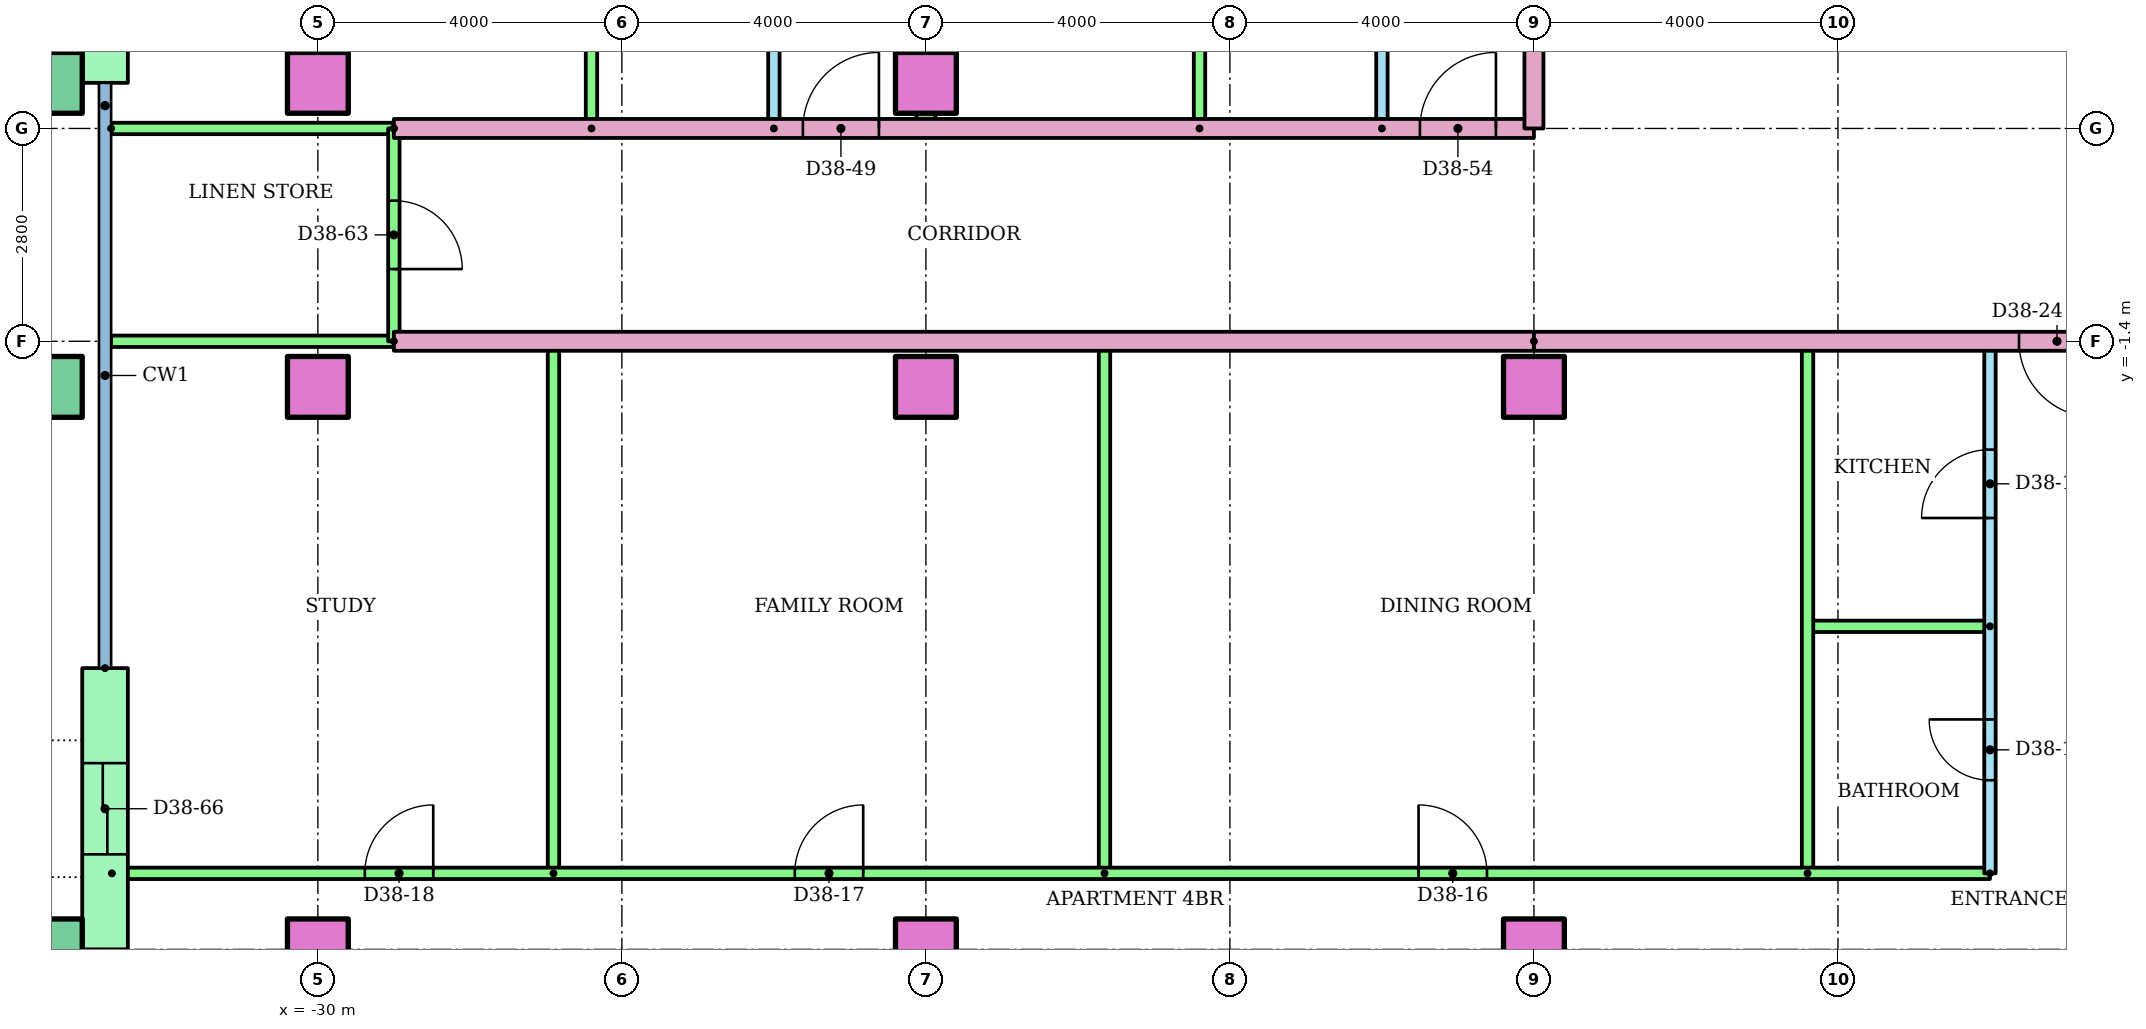
"""IFC4 building model, lengths in metres.
Left out: names, types, materials, properties, quantities, classifications, styles, units other than length and angle.
Written with IfcOpenShell. Run it as: python <this file> out.ifc"""

import sys

from ifc_helpers import new_model, si_unit, direction, frame, frame_2d, origin, origin_2d, place, context, subcontext, project, spatial, rectangle, hollow_rectangle, extrude, element, fill, save


model = new_model("IFC4")
c1 = context("Model", 3, precision=1e-05, world=origin(), true_north=direction((0.0, 1.0)))
c2 = subcontext(c1, "Body", "Model", "MODEL_VIEW")
j1 = project(units=[si_unit("LENGTHUNIT", "METRE"), si_unit("PLANEANGLEUNIT", "RADIAN")], contexts=[c1])
p1 = place(None, origin())
s1 = spatial("IfcSite", under=j1, at=p1, CompositionType="ELEMENT")
p2 = place(p1, origin())
s2 = spatial("IfcBuilding", under=s1, at=p2, CompositionType="ELEMENT")
p3 = place(p2, frame((0.0, 0.0, 145.4)))
s3 = spatial("IfcBuildingStorey", under=s2, at=p3, CompositionType="ELEMENT", Elevation=145.4)
p4 = place(p3, frame((-33.5, -9.4, 0.0)))
e1 = element("IfcColumn", 1, at=p4, inside=s3, PredefinedType="COLUMN", context=c2, shape_type="SweptSolid", body=[
    extrude(hollow_rectangle(XDim=0.8, YDim=0.8, WallThickness=0.04, at=origin_2d()), origin(), (0.0, 0.0, 1.0), 3.2),
])
for number, where in (
    (2, (-30.0, -9.4, 0.0)),
    (3, (-22.0, -9.4, 0.0)),
    (4, (-14.0, -9.4, 0.0)),
):
    element("IfcColumn", number, at=place(p3, frame(where)), inside=s3, PredefinedType="COLUMN", context=c2, shape_type="SweptSolid", body=[
        extrude(rectangle(XDim=0.8, YDim=0.8, at=origin_2d()), origin(), (0.0, 0.0, 1.0), 3.2),
    ])
p5 = place(p3, frame((-33.5, -2.0, 0.0)))
e5 = element("IfcColumn", 5, at=p5, inside=s3, PredefinedType="COLUMN", context=c2, shape_type="SweptSolid", body=[
    extrude(hollow_rectangle(XDim=0.8, YDim=0.8, WallThickness=0.04, at=origin_2d()), origin(), (0.0, 0.0, 1.0), 3.2),
])
for number, where in (
    (6, (-30.0, -2.0, 0.0)),
    (7, (-22.0, -2.0, 0.0)),
    (8, (-14.0, -2.0, 0.0)),
):
    element("IfcColumn", number, at=place(p3, frame(where)), inside=s3, PredefinedType="COLUMN", context=c2, shape_type="SweptSolid", body=[
        extrude(rectangle(XDim=0.8, YDim=0.8, at=origin_2d()), origin(), (0.0, 0.0, 1.0), 3.2),
    ])
p6 = place(p3, frame((-33.5, 2.0, 0.0)))
e9 = element("IfcColumn", 9, at=p6, inside=s3, PredefinedType="COLUMN", context=c2, shape_type="SweptSolid", body=[
    extrude(hollow_rectangle(XDim=0.8, YDim=0.8, WallThickness=0.04, at=origin_2d()), origin(), (0.0, 0.0, 1.0), 3.2),
])
for number, where in (
    (10, (-30.0, 2.0, 0.0)),
    (11, (-22.0, 2.0, 0.0)),
):
    element("IfcColumn", number, at=place(p3, frame(where)), inside=s3, PredefinedType="COLUMN", context=c2, shape_type="SweptSolid", body=[
        extrude(rectangle(XDim=0.8, YDim=0.8, at=origin_2d()), origin(), (0.0, 0.0, 1.0), 3.2),
    ])
p7 = place(p3, frame((-32.8, 6.5, 0.0), z_axis=(0.0, 0.0, 1.0), x_axis=(0.0, -1.0, 0.0)))
e12 = element("IfcWall", 12, at=p7, inside=s3, PredefinedType="STANDARD", context=c2, shape_type="SweptSolid", body=[
    extrude(rectangle(XDim=4.5, YDim=0.6, at=frame_2d((2.25, 0.0))), origin(), (0.0, 0.0, 1.0), 2.92),
])
p8 = place(p7, frame((1.65, 0.0, 0.0)))
e13 = element("IfcOpeningElement", 13, at=p8, cuts=e12, PredefinedType="OPENING", context=c2, shape_type="SweptSolid", body=[
    extrude(rectangle(XDim=1.2, YDim=2.1, at=frame_2d((0.6, 1.05))), frame((0.0, 0.31, 0.0), z_axis=(0.0, -1.0, 0.0), x_axis=(1.0, 0.0, 0.0)), (0.0, 0.0, 1.0), 0.62),
])
p9 = place(p3, frame((-32.8, -5.7, 0.0), z_axis=(0.0, 0.0, 1.0), x_axis=(0.0, -1.0, 0.0)))
e14 = element("IfcWall", 14, at=p9, inside=s3, PredefinedType="STANDARD", context=c2, shape_type="SweptSolid", body=[
    extrude(rectangle(XDim=3.7, YDim=0.6, at=frame_2d((1.85, 0.0))), origin(), (0.0, 0.0, 1.0), 2.92),
])
p10 = place(p9, frame((1.25, 0.0, 0.0)))
e15 = element("IfcOpeningElement", 15, at=p10, cuts=e14, PredefinedType="OPENING", context=c2, shape_type="SweptSolid", body=[
    extrude(rectangle(XDim=1.2, YDim=2.1, at=frame_2d((0.6, 1.05))), frame((0.0, 0.31, 0.0), z_axis=(0.0, -1.0, 0.0), x_axis=(1.0, 0.0, 0.0)), (0.0, 0.0, 1.0), 0.62),
])
p11 = place(p3, frame((-8.0, -8.4, 0.0), z_axis=(0.0, 0.0, 1.0), x_axis=(0.0, 1.0, 0.0)))
e16 = element("IfcWall", 16, at=p11, inside=s3, PredefinedType="PARTITIONING", context=c2, shape_type="SweptSolid", body=[
    extrude(rectangle(XDim=7.0, YDim=0.15, at=frame_2d((3.5, 0.0))), origin(), (0.0, 0.0, 1.0), 2.4),
])
p12 = place(p11, frame((4.675, 0.0, 0.0)))
e17 = element("IfcOpeningElement", 17, at=p12, cuts=e16, PredefinedType="OPENING", context=c2, shape_type="SweptSolid", body=[
    extrude(rectangle(XDim=0.9, YDim=2.1, at=frame_2d((0.45, 1.05))), frame((0.0, 0.085, 0.0), z_axis=(0.0, -1.0, 0.0), x_axis=(1.0, 0.0, 0.0)), (0.0, 0.0, 1.0), 0.17),
])
p13 = place(p11, frame((1.225, 0.0, 0.0)))
e18 = element("IfcOpeningElement", 18, at=p13, cuts=e16, PredefinedType="OPENING", context=c2, shape_type="SweptSolid", body=[
    extrude(rectangle(XDim=0.8, YDim=2.1, at=frame_2d((0.4, 1.05))), frame((0.0, 0.085, 0.0), z_axis=(0.0, -1.0, 0.0), x_axis=(1.0, 0.0, 0.0)), (0.0, 0.0, 1.0), 0.17),
])
p14 = place(p3, frame((-8.0, -5.15, 0.0), z_axis=(0.0, 0.0, 1.0), x_axis=(-1.0, 0.0, 0.0)))
e19 = element("IfcWall", 19, at=p14, inside=s3, PredefinedType="PARTITIONING", context=c2, shape_type="SweptSolid", body=[
    extrude(rectangle(XDim=2.4, YDim=0.15, at=frame_2d((1.2, 0.0))), origin(), (0.0, 0.0, 1.0), 2.4),
])
for number, where, z_axis, x_axis in (
    (20, (-10.4, -8.4, 0.0), (0.0, 0.0, 1.0), (0.0, 1.0, 0.0)),
    (21, (-19.65, -8.4, 0.0), (0.0, 0.0, 1.0), (0.0, 1.0, 0.0)),
    (22, (-26.9, -8.4, 0.0), (0.0, 0.0, 1.0), (0.0, 1.0, 0.0)),
):
    element("IfcWall", number, at=place(p3, frame(where, z_axis=z_axis, x_axis=x_axis)), inside=s3, PredefinedType="PARTITIONING", context=c2, shape_type="SweptSolid", body=[
        extrude(rectangle(XDim=7.0, YDim=0.15, at=frame_2d((3.5, 0.0))), origin(), (0.0, 0.0, 1.0), 2.4),
    ])
p15 = place(p3, frame((-32.71, -8.4, 0.0)))
e23 = element("IfcWall", 23, at=p15, inside=s3, PredefinedType="PARTITIONING", context=c2, shape_type="SweptSolid", body=[
    extrude(rectangle(XDim=24.71, YDim=0.15, at=frame_2d((12.355, 0.0))), origin(), (0.0, 0.0, 1.0), 2.4),
])
p16 = place(p15, frame((17.192, 0.0, 0.0)))
e24 = element("IfcOpeningElement", 24, at=p16, cuts=e23, PredefinedType="OPENING", context=c2, shape_type="SweptSolid", body=[
    extrude(rectangle(XDim=0.9, YDim=2.1, at=frame_2d((0.45, 1.05))), frame((0.0, 0.085, 0.0), z_axis=(0.0, -1.0, 0.0), x_axis=(1.0, 0.0, 0.0)), (0.0, 0.0, 1.0), 0.17),
])
p17 = place(p15, frame((8.985, 0.0, 0.0)))
e25 = element("IfcOpeningElement", 25, at=p17, cuts=e23, PredefinedType="OPENING", context=c2, shape_type="SweptSolid", body=[
    extrude(rectangle(XDim=0.9, YDim=2.1, at=frame_2d((0.45, 1.05))), frame((0.0, 0.085, 0.0), z_axis=(0.0, -1.0, 0.0), x_axis=(1.0, 0.0, 0.0)), (0.0, 0.0, 1.0), 0.17),
])
p18 = place(p15, frame((3.328, 0.0, 0.0)))
e26 = element("IfcOpeningElement", 26, at=p18, cuts=e23, PredefinedType="OPENING", context=c2, shape_type="SweptSolid", body=[
    extrude(rectangle(XDim=0.9, YDim=2.1, at=frame_2d((0.45, 1.05))), frame((0.0, 0.085, 0.0), z_axis=(0.0, -1.0, 0.0), x_axis=(1.0, 0.0, 0.0)), (0.0, 0.0, 1.0), 0.17),
])
p19 = place(p3, frame((-14.0, -1.4, 0.0), z_axis=(0.0, 0.0, 1.0), x_axis=(-1.0, 0.0, 0.0)))
e27 = element("IfcWall", 27, at=p19, inside=s3, PredefinedType="PARTITIONING", context=c2, shape_type="SweptSolid", body=[
    extrude(rectangle(XDim=15.0, YDim=0.25, at=frame_2d((7.5, 0.0))), origin(), (0.0, 0.0, 1.0), 2.4),
])
p20 = place(p3, frame((-29.0, -1.4, 0.0), z_axis=(0.0, 0.0, 1.0), x_axis=(-1.0, 0.0, 0.0)))
e28 = element("IfcWall", 28, at=p20, inside=s3, PredefinedType="PARTITIONING", context=c2, shape_type="SweptSolid", body=[
    extrude(rectangle(XDim=3.72, YDim=0.15, at=frame_2d((1.86, 0.0))), origin(), (0.0, 0.0, 1.0), 2.4),
])
p21 = place(p3, frame((-24.0, 1.4, 0.0), z_axis=(0.0, 0.0, 1.0), x_axis=(0.0, 1.0, 0.0)))
e29 = element("IfcWall", 29, at=p21, inside=s3, PredefinedType="PARTITIONING", context=c2, shape_type="SweptSolid", body=[
    extrude(rectangle(XDim=9.4, YDim=0.15, at=frame_2d((4.7, 0.0))), origin(), (0.0, 0.0, 1.0), 2.4),
])
p22 = place(p21, frame((2.175, 0.0, 0.0)))
e30 = element("IfcOpeningElement", 30, at=p22, cuts=e29, PredefinedType="OPENING", context=c2, shape_type="SweptSolid", body=[
    extrude(rectangle(XDim=0.9, YDim=2.1, at=frame_2d((0.45, 1.05))), frame((0.0, 0.085, 0.0), z_axis=(0.0, -1.0, 0.0), x_axis=(1.0, 0.0, 0.0)), (0.0, 0.0, 1.0), 0.17),
])
p23 = place(p21, frame((6.925, 0.0, 0.0)))
e31 = element("IfcOpeningElement", 31, at=p23, cuts=e29, PredefinedType="OPENING", context=c2, shape_type="SweptSolid", body=[
    extrude(rectangle(XDim=0.8, YDim=2.1, at=frame_2d((0.4, 1.05))), frame((0.0, 0.085, 0.0), z_axis=(0.0, -1.0, 0.0), x_axis=(1.0, 0.0, 0.0)), (0.0, 0.0, 1.0), 0.17),
])
p24 = place(p3, frame((-26.4, 1.4, 0.0), z_axis=(0.0, 0.0, 1.0), x_axis=(0.0, 1.0, 0.0)))
e32 = element("IfcWall", 32, at=p24, inside=s3, PredefinedType="PARTITIONING", context=c2, shape_type="SweptSolid", body=[
    extrude(rectangle(XDim=9.4, YDim=0.15, at=frame_2d((4.7, 0.0))), origin(), (0.0, 0.0, 1.0), 2.4),
])
p25 = place(p3, frame((-16.0, 1.4, 0.0), z_axis=(0.0, 0.0, 1.0), x_axis=(0.0, 1.0, 0.0)))
e33 = element("IfcWall", 33, at=p25, inside=s3, PredefinedType="PARTITIONING", context=c2, shape_type="SweptSolid", body=[
    extrude(rectangle(XDim=9.4, YDim=0.15, at=frame_2d((4.7, 0.0))), origin(), (0.0, 0.0, 1.0), 2.4),
])
p26 = place(p25, frame((2.175, 0.0, 0.0)))
e34 = element("IfcOpeningElement", 34, at=p26, cuts=e33, PredefinedType="OPENING", context=c2, shape_type="SweptSolid", body=[
    extrude(rectangle(XDim=0.9, YDim=2.1, at=frame_2d((0.45, 1.05))), frame((0.0, 0.085, 0.0), z_axis=(0.0, -1.0, 0.0), x_axis=(1.0, 0.0, 0.0)), (0.0, 0.0, 1.0), 0.17),
])
p27 = place(p25, frame((6.925, 0.0, 0.0)))
e35 = element("IfcOpeningElement", 35, at=p27, cuts=e33, PredefinedType="OPENING", context=c2, shape_type="SweptSolid", body=[
    extrude(rectangle(XDim=0.8, YDim=2.1, at=frame_2d((0.4, 1.05))), frame((0.0, 0.085, 0.0), z_axis=(0.0, -1.0, 0.0), x_axis=(1.0, 0.0, 0.0)), (0.0, 0.0, 1.0), 0.17),
])
p28 = place(p3, frame((-18.4, 1.4, 0.0), z_axis=(0.0, 0.0, 1.0), x_axis=(0.0, 1.0, 0.0)))
e36 = element("IfcWall", 36, at=p28, inside=s3, PredefinedType="PARTITIONING", context=c2, shape_type="SweptSolid", body=[
    extrude(rectangle(XDim=9.4, YDim=0.15, at=frame_2d((4.7, 0.0))), origin(), (0.0, 0.0, 1.0), 2.4),
])
p29 = place(p3, frame((-22.0, 18.721, 0.0), z_axis=(0.0, 0.0, 1.0), x_axis=(0.0, -1.0, 0.0)))
e37 = element("IfcWall", 37, at=p29, inside=s3, PredefinedType="PARTITIONING", context=c2, shape_type="SweptSolid", body=[
    extrude(rectangle(XDim=17.321, YDim=0.25, at=frame_2d((8.661, 0.0))), origin(), (0.0, 0.0, 1.0), 2.4),
])
p30 = place(p3, frame((-29.0, 1.4, 0.0)))
e38 = element("IfcWall", 38, at=p30, inside=s3, PredefinedType="PARTITIONING", context=c2, shape_type="SweptSolid", body=[
    extrude(rectangle(XDim=15.0, YDim=0.25, at=frame_2d((7.5, 0.0))), origin(), (0.0, 0.0, 1.0), 2.4),
])
p31 = place(p30, frame((5.382, 0.0, 0.0)))
e39 = element("IfcOpeningElement", 39, at=p31, cuts=e38, PredefinedType="OPENING", context=c2, shape_type="SweptSolid", body=[
    extrude(rectangle(XDim=1.0, YDim=2.1, at=frame_2d((0.5, 1.05))), frame((0.0, 0.135, 0.0), z_axis=(0.0, -1.0, 0.0), x_axis=(1.0, 0.0, 0.0)), (0.0, 0.0, 1.0), 0.27),
])
p32 = place(p30, frame((13.5, 0.0, 0.0)))
e40 = element("IfcOpeningElement", 40, at=p32, cuts=e38, PredefinedType="OPENING", context=c2, shape_type="SweptSolid", body=[
    extrude(rectangle(XDim=1.0, YDim=2.1, at=frame_2d((0.5, 1.05))), frame((0.0, 0.135, 0.0), z_axis=(0.0, -1.0, 0.0), x_axis=(1.0, 0.0, 0.0)), (0.0, 0.0, 1.0), 0.27),
])
p33 = place(p3, frame((-32.72, 1.4, 0.0)))
e41 = element("IfcWall", 41, at=p33, inside=s3, PredefinedType="PARTITIONING", context=c2, shape_type="SweptSolid", body=[
    extrude(rectangle(XDim=3.72, YDim=0.15, at=frame_2d((1.86, 0.0))), origin(), (0.0, 0.0, 1.0), 2.4),
])
p34 = place(p3, frame((-29.0, 1.4, 0.0), z_axis=(0.0, 0.0, 1.0), x_axis=(0.0, -1.0, 0.0)))
e42 = element("IfcWall", 42, at=p34, inside=s3, PredefinedType="PARTITIONING", context=c2, shape_type="SweptSolid", body=[
    extrude(rectangle(XDim=2.8, YDim=0.15, at=frame_2d((1.4, 0.0))), origin(), (0.0, 0.0, 1.0), 2.4),
])
p35 = place(p34, frame((0.95, 0.0, 0.0)))
e43 = element("IfcOpeningElement", 43, at=p35, cuts=e42, PredefinedType="OPENING", context=c2, shape_type="SweptSolid", body=[
    extrude(rectangle(XDim=0.9, YDim=2.1, at=frame_2d((0.45, 1.05))), frame((0.0, 0.085, 0.0), z_axis=(0.0, -1.0, 0.0), x_axis=(1.0, 0.0, 0.0)), (0.0, 0.0, 1.0), 0.17),
])
p36 = place(p3, frame((14.0, -1.4, 0.0), z_axis=(0.0, 0.0, 1.0), x_axis=(-1.0, 0.0, 0.0)))
e44 = element("IfcWall", 44, at=p36, inside=s3, PredefinedType="PARTITIONING", context=c2, shape_type="SweptSolid", body=[
    extrude(rectangle(XDim=28.0, YDim=0.25, at=frame_2d((14.0, 0.0))), origin(), (0.0, 0.0, 1.0), 2.4),
])
p37 = place(p36, frame((20.618, 0.0, 0.0)))
e45 = element("IfcOpeningElement", 45, at=p37, cuts=e44, PredefinedType="OPENING", context=c2, shape_type="SweptSolid", body=[
    extrude(rectangle(XDim=1.0, YDim=2.1, at=frame_2d((0.5, 1.05))), frame((0.0, 0.135, 0.0), z_axis=(0.0, -1.0, 0.0), x_axis=(1.0, 0.0, 0.0)), (0.0, 0.0, 1.0), 0.27),
])
p38 = place(p36, frame((18.382, 0.0, 0.0)))
e46 = element("IfcOpeningElement", 46, at=p38, cuts=e44, PredefinedType="OPENING", context=c2, shape_type="SweptSolid", body=[
    extrude(rectangle(XDim=1.0, YDim=2.1, at=frame_2d((0.5, 1.05))), frame((0.0, 0.135, 0.0), z_axis=(0.0, -1.0, 0.0), x_axis=(1.0, 0.0, 0.0)), (0.0, 0.0, 1.0), 0.27),
])
p39 = place(p3, frame((-14.0, 3.0, 0.0), z_axis=(0.0, 0.0, 1.0), x_axis=(0.0, -1.0, 0.0)))
e47 = element("IfcWall", 47, at=p39, inside=s3, PredefinedType="PARTITIONING", context=c2, shape_type="SweptSolid", body=[
    extrude(rectangle(XDim=1.6, YDim=0.25, at=frame_2d((0.8, 0.0))), origin(), (0.0, 0.0, 1.0), 2.4),
])
p40 = place(p12, origin())
e48 = element("IfcDoor", 48, at=p40, inside=s3, OperationType="SINGLE_SWING_LEFT", PredefinedType="DOOR", context=c2, shape_type="SweptSolid", body=[
    extrude(rectangle(XDim=0.9, YDim=2.1, at=frame_2d((0.45, 1.05))), frame((0.0, 0.025, 0.0), z_axis=(0.0, -1.0, 0.0), x_axis=(1.0, 0.0, 0.0)), (0.0, 0.0, 1.0), 0.05),
])
fill(e17, e48)
p41 = place(p13, origin())
e49 = element("IfcDoor", 49, at=p41, inside=s3, OperationType="SINGLE_SWING_RIGHT", PredefinedType="DOOR", context=c2, shape_type="SweptSolid", body=[
    extrude(rectangle(XDim=0.8, YDim=2.1, at=frame_2d((0.4, 1.05))), frame((0.0, 0.025, 0.0), z_axis=(0.0, -1.0, 0.0), x_axis=(1.0, 0.0, 0.0)), (0.0, 0.0, 1.0), 0.05),
])
fill(e18, e49)
p42 = place(p16, origin())
e50 = element("IfcDoor", 50, at=p42, inside=s3, OperationType="SINGLE_SWING_LEFT", PredefinedType="DOOR", context=c2, shape_type="SweptSolid", body=[
    extrude(rectangle(XDim=0.9, YDim=2.1, at=frame_2d((0.45, 1.05))), frame((0.0, 0.025, 0.0), z_axis=(0.0, -1.0, 0.0), x_axis=(1.0, 0.0, 0.0)), (0.0, 0.0, 1.0), 0.05),
])
fill(e24, e50)
p43 = place(p17, origin())
e51 = element("IfcDoor", 51, at=p43, inside=s3, OperationType="SINGLE_SWING_RIGHT", PredefinedType="DOOR", context=c2, shape_type="SweptSolid", body=[
    extrude(rectangle(XDim=0.9, YDim=2.1, at=frame_2d((0.45, 1.05))), frame((0.0, 0.025, 0.0), z_axis=(0.0, -1.0, 0.0), x_axis=(1.0, 0.0, 0.0)), (0.0, 0.0, 1.0), 0.05),
])
fill(e25, e51)
p44 = place(p18, origin())
e52 = element("IfcDoor", 52, at=p44, inside=s3, OperationType="SINGLE_SWING_RIGHT", PredefinedType="DOOR", context=c2, shape_type="SweptSolid", body=[
    extrude(rectangle(XDim=0.9, YDim=2.1, at=frame_2d((0.45, 1.05))), frame((0.0, 0.025, 0.0), z_axis=(0.0, -1.0, 0.0), x_axis=(1.0, 0.0, 0.0)), (0.0, 0.0, 1.0), 0.05),
])
fill(e26, e52)
p45 = place(p37, origin())
e53 = element("IfcDoor", 53, at=p45, inside=s3, OperationType="SINGLE_SWING_LEFT", PredefinedType="DOOR", context=c2, shape_type="SweptSolid", body=[
    extrude(rectangle(XDim=1.0, YDim=2.1, at=frame_2d((0.5, 1.05))), frame((0.0, 0.025, 0.0), z_axis=(0.0, -1.0, 0.0), x_axis=(1.0, 0.0, 0.0)), (0.0, 0.0, 1.0), 0.05),
])
fill(e45, e53)
p46 = place(p31, origin())
e54 = element("IfcDoor", 54, at=p46, inside=s3, OperationType="SINGLE_SWING_RIGHT", PredefinedType="DOOR", context=c2, shape_type="SweptSolid", body=[
    extrude(rectangle(XDim=1.0, YDim=2.1, at=frame_2d((0.5, 1.05))), frame((0.0, 0.025, 0.0), z_axis=(0.0, -1.0, 0.0), x_axis=(1.0, 0.0, 0.0)), (0.0, 0.0, 1.0), 0.05),
])
fill(e39, e54)
p47 = place(p32, origin())
e55 = element("IfcDoor", 55, at=p47, inside=s3, OperationType="SINGLE_SWING_RIGHT", PredefinedType="DOOR", context=c2, shape_type="SweptSolid", body=[
    extrude(rectangle(XDim=1.0, YDim=2.1, at=frame_2d((0.5, 1.05))), frame((0.0, 0.025, 0.0), z_axis=(0.0, -1.0, 0.0), x_axis=(1.0, 0.0, 0.0)), (0.0, 0.0, 1.0), 0.05),
])
fill(e40, e55)
p48 = place(p35, origin())
e56 = element("IfcDoor", 56, at=p48, inside=s3, OperationType="SINGLE_SWING_RIGHT", PredefinedType="DOOR", context=c2, shape_type="SweptSolid", body=[
    extrude(rectangle(XDim=0.9, YDim=2.1, at=frame_2d((0.45, 1.05))), frame((0.0, 0.025, 0.0), z_axis=(0.0, -1.0, 0.0), x_axis=(1.0, 0.0, 0.0)), (0.0, 0.0, 1.0), 0.05),
])
fill(e43, e56)
p49 = place(p10, origin())
e57 = element("IfcDoor", 57, at=p49, inside=s3, OperationType="SLIDING_TO_LEFT", PredefinedType="DOOR", context=c2, shape_type="SweptSolid", body=[
    extrude(rectangle(XDim=1.2, YDim=2.1, at=frame_2d((0.6, 1.05))), frame((0.0, 0.025, 0.0), z_axis=(0.0, -1.0, 0.0), x_axis=(1.0, 0.0, 0.0)), (0.0, 0.0, 1.0), 0.05),
])
fill(e15, e57)
save(model, sys.argv[1])
